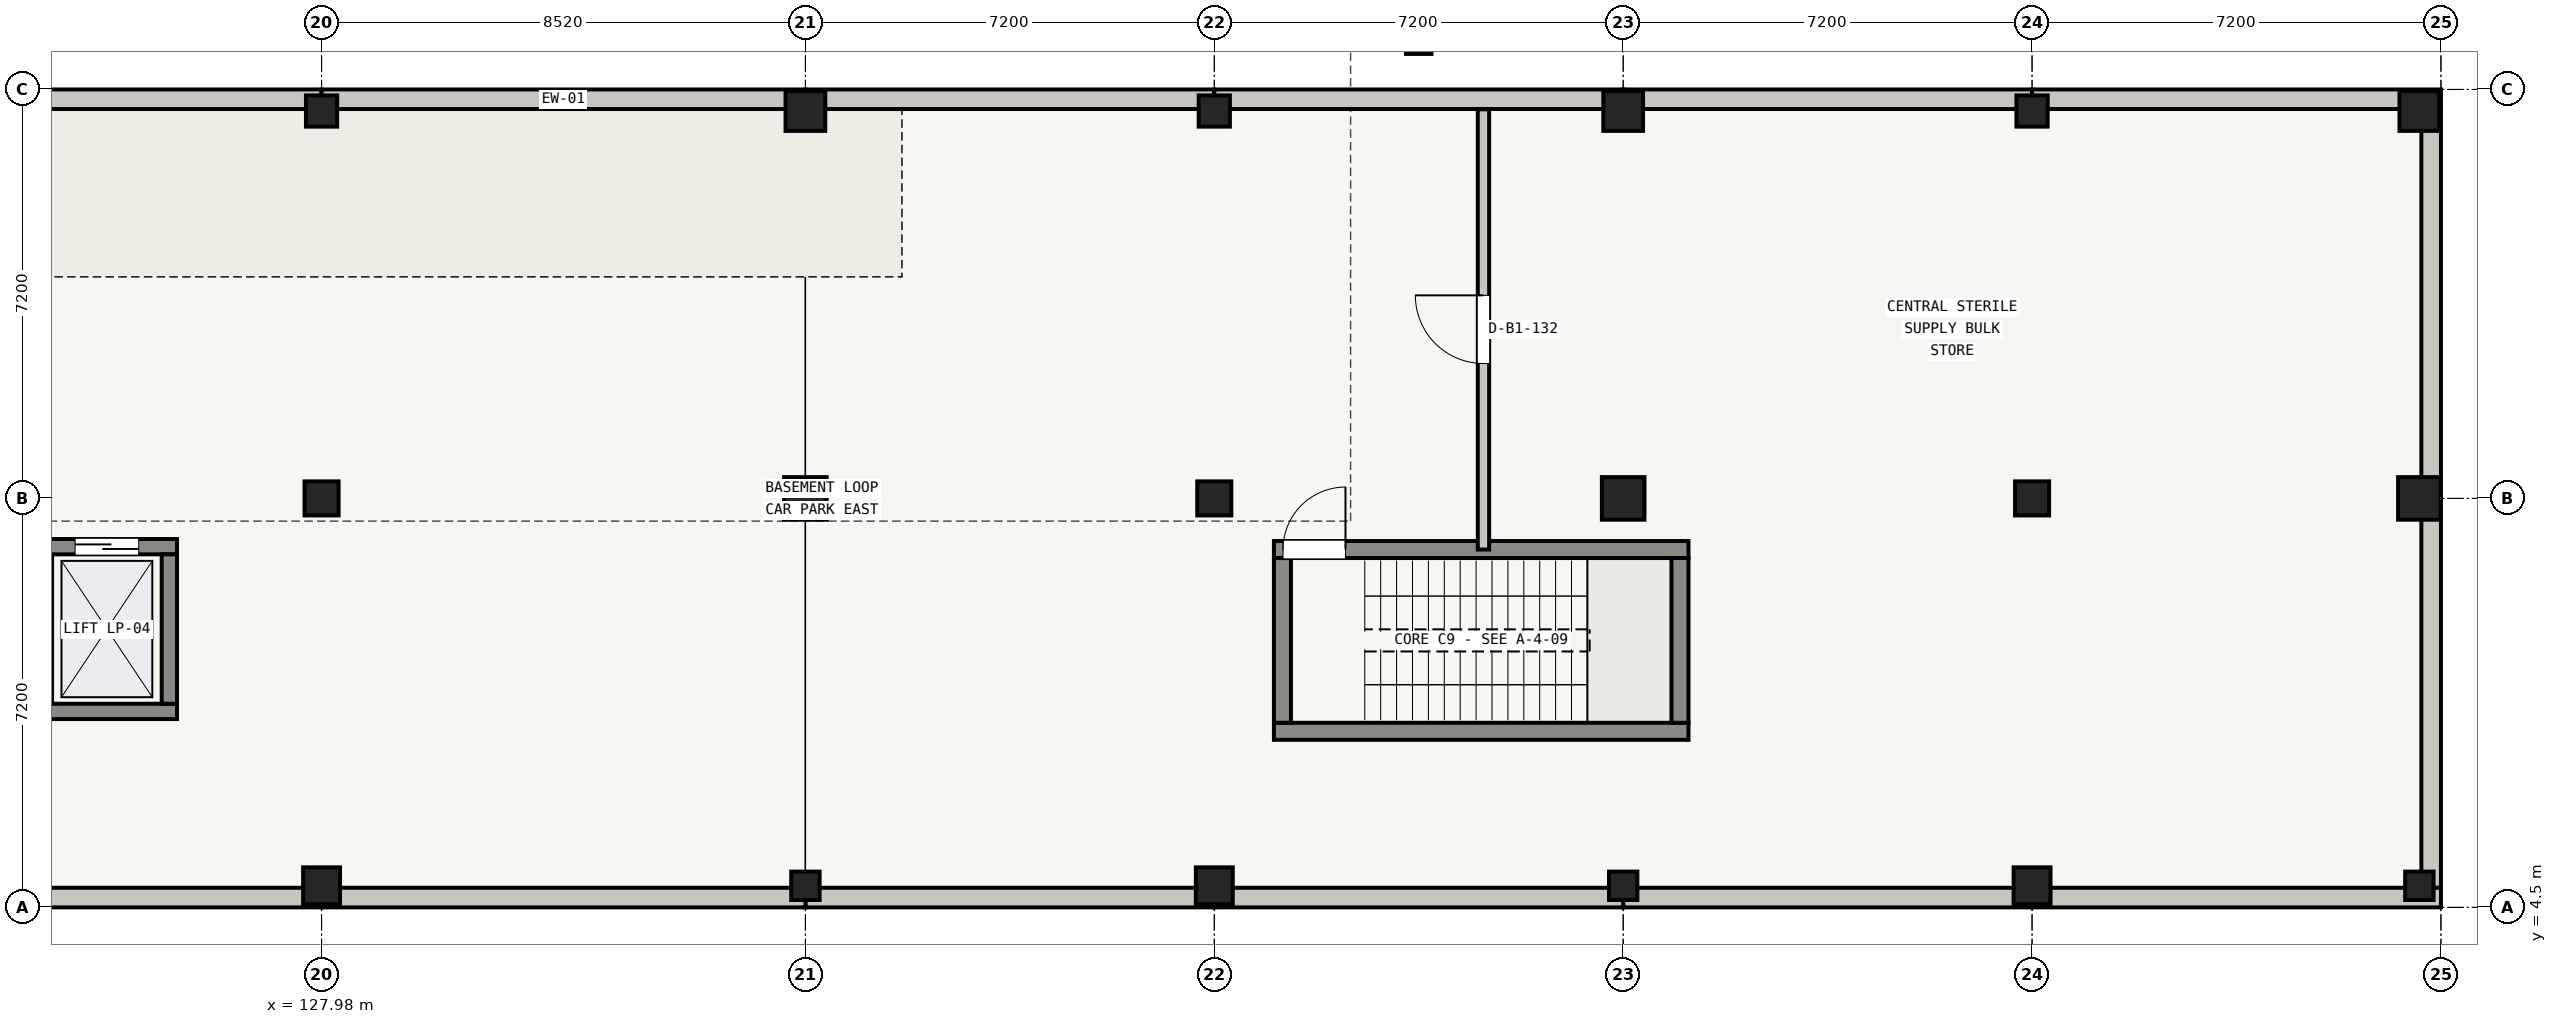
"""IFC4 building model, lengths in metres.
Left out: names, types, materials, properties, quantities, classifications, styles, units other than length and angle.
Written with IfcOpenShell. Run it as: python <this file> out.ifc"""

import sys

from ifc_helpers import new_model, si_unit, direction, frame, frame_2d, origin, origin_2d, place, context, subcontext, project, spatial, rectangle, extrude, element, fill, save


model = new_model("IFC4")
c1 = context("Model", 3, precision=1e-05, world=origin(), true_north=direction((0.0, 1.0)))
c2 = subcontext(c1, "Body", "Model", "MODEL_VIEW")
j1 = project(units=[si_unit("LENGTHUNIT", "METRE"), si_unit("PLANEANGLEUNIT", "RADIAN")], contexts=[c1])
p1 = place(None, origin())
s1 = spatial("IfcSite", under=j1, at=p1, CompositionType="ELEMENT")
p2 = place(p1, origin())
s2 = spatial("IfcBuilding", under=s1, at=p2, CompositionType="ELEMENT")
p3 = place(p2, frame((0.0, 0.0, -4.5)))
s3 = spatial("IfcBuildingStorey", under=s2, at=p3, CompositionType="ELEMENT", Elevation=-4.5)
p4 = place(p3, frame((147.3, 19.75, -0.42), z_axis=(0.0, 0.0, 1.0), x_axis=(1.0, 0.0, 0.0)))
e1 = element("IfcColumn", 1, at=p4, inside=s3, PredefinedType="COLUMN", context=c2, shape_type="SweptSolid", body=[
    extrude(rectangle(XDim=0.45, YDim=0.45, at=origin_2d()), origin(), (0.0, 0.0, 1.0), 1.83),
])
p5 = place(p3, frame((127.98, 4.88, -0.42), z_axis=(0.0, 0.0, 1.0), x_axis=(1.0, 0.0, 0.0)))
e2 = element("IfcColumn", 2, at=p5, inside=s3, PredefinedType="COLUMN", context=c2, shape_type="SweptSolid", body=[
    extrude(rectangle(XDim=0.65, YDim=0.65, at=origin_2d()), origin(), (0.0, 0.0, 1.0), 4.625),
])
p6 = place(p3, frame((127.98, 11.7, -0.42), z_axis=(0.0, 0.0, 1.0), x_axis=(1.0, 0.0, 0.0)))
e3 = element("IfcColumn", 3, at=p6, inside=s3, PredefinedType="COLUMN", context=c2, shape_type="SweptSolid", body=[
    extrude(rectangle(XDim=0.6, YDim=0.6, at=origin_2d()), origin(), (0.0, 0.0, 1.0), 4.625),
])
p7 = place(p3, frame((127.98, 18.52, -0.42), z_axis=(0.0, 0.0, 1.0), x_axis=(1.0, 0.0, 0.0)))
e4 = element("IfcColumn", 4, at=p7, inside=s3, PredefinedType="COLUMN", context=c2, shape_type="SweptSolid", body=[
    extrude(rectangle(XDim=0.55, YDim=0.55, at=origin_2d()), origin(), (0.0, 0.0, 1.0), 4.625),
])
p8 = place(p3, frame((136.5, 4.88, -0.42), z_axis=(0.0, 0.0, 1.0), x_axis=(1.0, 0.0, 0.0)))
e5 = element("IfcColumn", 5, at=p8, inside=s3, PredefinedType="COLUMN", context=c2, shape_type="SweptSolid", body=[
    extrude(rectangle(XDim=0.5, YDim=0.5, at=origin_2d()), origin(), (0.0, 0.0, 1.0), 4.625),
])
p9 = place(p3, frame((136.5, 11.7, -0.42), z_axis=(0.0, 0.0, 1.0), x_axis=(1.0, 0.0, 0.0)))
e6 = element("IfcColumn", 6, at=p9, inside=s3, PredefinedType="COLUMN", context=c2, shape_type="SweptSolid", body=[
    extrude(rectangle(XDim=0.75, YDim=0.75, at=origin_2d()), origin(), (0.0, 0.0, 1.0), 4.625),
])
p10 = place(p3, frame((136.5, 18.52, -0.42), z_axis=(0.0, 0.0, 1.0), x_axis=(1.0, 0.0, 0.0)))
e7 = element("IfcColumn", 7, at=p10, inside=s3, PredefinedType="COLUMN", context=c2, shape_type="SweptSolid", body=[
    extrude(rectangle(XDim=0.7, YDim=0.7, at=origin_2d()), origin(), (0.0, 0.0, 1.0), 4.625),
])
p11 = place(p3, frame((143.7, 4.88, -0.42), z_axis=(0.0, 0.0, 1.0), x_axis=(1.0, 0.0, 0.0)))
e8 = element("IfcColumn", 8, at=p11, inside=s3, PredefinedType="COLUMN", context=c2, shape_type="SweptSolid", body=[
    extrude(rectangle(XDim=0.65, YDim=0.65, at=origin_2d()), origin(), (0.0, 0.0, 1.0), 4.625),
])
p12 = place(p3, frame((143.7, 11.7, -0.42), z_axis=(0.0, 0.0, 1.0), x_axis=(1.0, 0.0, 0.0)))
e9 = element("IfcColumn", 9, at=p12, inside=s3, PredefinedType="COLUMN", context=c2, shape_type="SweptSolid", body=[
    extrude(rectangle(XDim=0.6, YDim=0.6, at=origin_2d()), origin(), (0.0, 0.0, 1.0), 4.625),
])
p13 = place(p3, frame((143.7, 18.52, -0.42), z_axis=(0.0, 0.0, 1.0), x_axis=(1.0, 0.0, 0.0)))
e10 = element("IfcColumn", 10, at=p13, inside=s3, PredefinedType="COLUMN", context=c2, shape_type="SweptSolid", body=[
    extrude(rectangle(XDim=0.55, YDim=0.55, at=origin_2d()), origin(), (0.0, 0.0, 1.0), 4.625),
])
p14 = place(p3, frame((150.9, 4.88, -0.42), z_axis=(0.0, 0.0, 1.0), x_axis=(1.0, 0.0, 0.0)))
e11 = element("IfcColumn", 11, at=p14, inside=s3, PredefinedType="COLUMN", context=c2, shape_type="SweptSolid", body=[
    extrude(rectangle(XDim=0.5, YDim=0.5, at=origin_2d()), origin(), (0.0, 0.0, 1.0), 4.625),
])
p15 = place(p3, frame((150.9, 11.7, -0.42), z_axis=(0.0, 0.0, 1.0), x_axis=(1.0, 0.0, 0.0)))
e12 = element("IfcColumn", 12, at=p15, inside=s3, PredefinedType="COLUMN", context=c2, shape_type="SweptSolid", body=[
    extrude(rectangle(XDim=0.75, YDim=0.75, at=origin_2d()), origin(), (0.0, 0.0, 1.0), 4.625),
])
p16 = place(p3, frame((150.9, 18.52, -0.42), z_axis=(0.0, 0.0, 1.0), x_axis=(1.0, 0.0, 0.0)))
e13 = element("IfcColumn", 13, at=p16, inside=s3, PredefinedType="COLUMN", context=c2, shape_type="SweptSolid", body=[
    extrude(rectangle(XDim=0.7, YDim=0.7, at=origin_2d()), origin(), (0.0, 0.0, 1.0), 4.625),
])
p17 = place(p3, frame((158.1, 4.88, -0.42), z_axis=(0.0, 0.0, 1.0), x_axis=(1.0, 0.0, 0.0)))
e14 = element("IfcColumn", 14, at=p17, inside=s3, PredefinedType="COLUMN", context=c2, shape_type="SweptSolid", body=[
    extrude(rectangle(XDim=0.65, YDim=0.65, at=origin_2d()), origin(), (0.0, 0.0, 1.0), 4.625),
])
p18 = place(p3, frame((158.1, 11.7, -0.42), z_axis=(0.0, 0.0, 1.0), x_axis=(1.0, 0.0, 0.0)))
e15 = element("IfcColumn", 15, at=p18, inside=s3, PredefinedType="COLUMN", context=c2, shape_type="SweptSolid", body=[
    extrude(rectangle(XDim=0.6, YDim=0.6, at=origin_2d()), origin(), (0.0, 0.0, 1.0), 4.625),
])
p19 = place(p3, frame((158.1, 18.52, -0.42), z_axis=(0.0, 0.0, 1.0), x_axis=(1.0, 0.0, 0.0)))
e16 = element("IfcColumn", 16, at=p19, inside=s3, PredefinedType="COLUMN", context=c2, shape_type="SweptSolid", body=[
    extrude(rectangle(XDim=0.55, YDim=0.55, at=origin_2d()), origin(), (0.0, 0.0, 1.0), 4.625),
])
p20 = place(p3, frame((164.92, 4.88, -0.42), z_axis=(0.0, 0.0, 1.0), x_axis=(1.0, 0.0, 0.0)))
e17 = element("IfcColumn", 17, at=p20, inside=s3, PredefinedType="COLUMN", context=c2, shape_type="SweptSolid", body=[
    extrude(rectangle(XDim=0.5, YDim=0.5, at=origin_2d()), origin(), (0.0, 0.0, 1.0), 4.625),
])
p21 = place(p3, frame((164.92, 11.7, -0.42), z_axis=(0.0, 0.0, 1.0), x_axis=(1.0, 0.0, 0.0)))
e18 = element("IfcColumn", 18, at=p21, inside=s3, PredefinedType="COLUMN", context=c2, shape_type="SweptSolid", body=[
    extrude(rectangle(XDim=0.75, YDim=0.75, at=origin_2d()), origin(), (0.0, 0.0, 1.0), 4.625),
])
p22 = place(p3, frame((164.92, 18.52, -0.42), z_axis=(0.0, 0.0, 1.0), x_axis=(1.0, 0.0, 0.0)))
e19 = element("IfcColumn", 19, at=p22, inside=s3, PredefinedType="COLUMN", context=c2, shape_type="SweptSolid", body=[
    extrude(rectangle(XDim=0.7, YDim=0.7, at=origin_2d()), origin(), (0.0, 0.0, 1.0), 4.625),
])
p23 = place(p3, frame((120.54, 18.728, -0.42), z_axis=(0.0, 0.0, 1.0), x_axis=(1.0, 0.0, 0.0)))
e20 = element("IfcWall", 20, at=p23, inside=s3, PredefinedType="SOLIDWALL", context=c2, shape_type="SweptSolid", body=[
    extrude(rectangle(XDim=7.44, YDim=0.345, at=frame_2d((3.72, 0.0))), origin(), (0.0, 0.0, 1.0), 3.99),
])
p24 = place(p3, frame((127.98, 18.728, -0.42), z_axis=(0.0, 0.0, 1.0), x_axis=(1.0, 0.0, 0.0)))
e21 = element("IfcWall", 21, at=p24, inside=s3, PredefinedType="SOLIDWALL", context=c2, shape_type="SweptSolid", body=[
    extrude(rectangle(XDim=8.52, YDim=0.345, at=frame_2d((4.26, 0.0))), origin(), (0.0, 0.0, 1.0), 4.01),
])
p25 = place(p3, frame((136.5, 18.728, -0.42), z_axis=(0.0, 0.0, 1.0), x_axis=(1.0, 0.0, 0.0)))
e22 = element("IfcWall", 22, at=p25, inside=s3, PredefinedType="SOLIDWALL", context=c2, shape_type="SweptSolid", body=[
    extrude(rectangle(XDim=7.2, YDim=0.345, at=frame_2d((3.6, 0.0))), origin(), (0.0, 0.0, 1.0), 4.01),
])
p26 = place(p3, frame((143.7, 18.728, -0.42), z_axis=(0.0, 0.0, 1.0), x_axis=(1.0, 0.0, 0.0)))
e23 = element("IfcWall", 23, at=p26, inside=s3, PredefinedType="SOLIDWALL", context=c2, shape_type="SweptSolid", body=[
    extrude(rectangle(XDim=7.2, YDim=0.345, at=frame_2d((3.6, 0.0))), origin(), (0.0, 0.0, 1.0), 3.99),
])
p27 = place(p3, frame((150.9, 18.728, -0.42), z_axis=(0.0, 0.0, 1.0), x_axis=(1.0, 0.0, 0.0)))
e24 = element("IfcWall", 24, at=p27, inside=s3, PredefinedType="SOLIDWALL", context=c2, shape_type="SweptSolid", body=[
    extrude(rectangle(XDim=7.2, YDim=0.345, at=frame_2d((3.6, 0.0))), origin(), (0.0, 0.0, 1.0), 3.81),
])
p28 = place(p3, frame((158.1, 18.728, -0.42), z_axis=(0.0, 0.0, 1.0), x_axis=(1.0, 0.0, 0.0)))
e25 = element("IfcWall", 25, at=p28, inside=s3, PredefinedType="SOLIDWALL", context=c2, shape_type="SweptSolid", body=[
    extrude(rectangle(XDim=7.2, YDim=0.345, at=frame_2d((3.6, 0.0))), origin(), (0.0, 0.0, 1.0), 3.81),
])
for number, where, z_axis, x_axis in (
    (26, (165.127, 18.555, -0.42), (0.0, 0.0, 1.0), (0.0, -1.0, 0.0)),
    (27, (165.127, 11.7, -0.42), (0.0, 0.0, 1.0), (0.0, -1.0, 0.0)),
):
    element("IfcWall", number, at=place(p3, frame(where, z_axis=z_axis, x_axis=x_axis)), inside=s3, PredefinedType="SOLIDWALL", context=c2, shape_type="SweptSolid", body=[
        extrude(rectangle(XDim=6.855, YDim=0.345, at=frame_2d((3.427, 0.0))), origin(), (0.0, 0.0, 1.0), 4.06),
    ])
p29 = place(p3, frame((165.3, 4.673, -0.42), z_axis=(0.0, 0.0, 1.0), x_axis=(-1.0, 0.0, 0.0)))
e28 = element("IfcWall", 28, at=p29, inside=s3, PredefinedType="SOLIDWALL", context=c2, shape_type="SweptSolid", body=[
    extrude(rectangle(XDim=7.2, YDim=0.345, at=frame_2d((3.6, 0.0))), origin(), (0.0, 0.0, 1.0), 4.01),
])
p30 = place(p3, frame((158.1, 4.673, -0.42), z_axis=(0.0, 0.0, 1.0), x_axis=(-1.0, 0.0, 0.0)))
e29 = element("IfcWall", 29, at=p30, inside=s3, PredefinedType="SOLIDWALL", context=c2, shape_type="SweptSolid", body=[
    extrude(rectangle(XDim=7.2, YDim=0.345, at=frame_2d((3.6, 0.0))), origin(), (0.0, 0.0, 1.0), 3.99),
])
for number, where, z_axis, x_axis in (
    (30, (150.9, 4.673, -0.42), (0.0, 0.0, 1.0), (-1.0, 0.0, 0.0)),
    (31, (143.7, 4.673, -0.42), (0.0, 0.0, 1.0), (-1.0, 0.0, 0.0)),
):
    element("IfcWall", number, at=place(p3, frame(where, z_axis=z_axis, x_axis=x_axis)), inside=s3, PredefinedType="SOLIDWALL", context=c2, shape_type="SweptSolid", body=[
        extrude(rectangle(XDim=7.2, YDim=0.345, at=frame_2d((3.6, 0.0))), origin(), (0.0, 0.0, 1.0), 3.99),
    ])
p31 = place(p3, frame((136.5, 4.673, -0.42), z_axis=(0.0, 0.0, 1.0), x_axis=(-1.0, 0.0, 0.0)))
e32 = element("IfcWall", 32, at=p31, inside=s3, PredefinedType="SOLIDWALL", context=c2, shape_type="SweptSolid", body=[
    extrude(rectangle(XDim=8.52, YDim=0.345, at=frame_2d((4.26, 0.0))), origin(), (0.0, 0.0, 1.0), 4.01),
])
p32 = place(p3, frame((127.98, 4.673, -0.42), z_axis=(0.0, 0.0, 1.0), x_axis=(-1.0, 0.0, 0.0)))
e33 = element("IfcWall", 33, at=p32, inside=s3, PredefinedType="SOLIDWALL", context=c2, shape_type="SweptSolid", body=[
    extrude(rectangle(XDim=7.44, YDim=0.345, at=frame_2d((3.72, 0.0))), origin(), (0.0, 0.0, 1.0), 4.01),
])
p33 = place(p3, frame((125.435, 7.95, 0.0), z_axis=(0.0, 0.0, 1.0), x_axis=(-1.0, 0.0, 0.0)))
e34 = element("IfcWall", 34, at=p33, inside=s3, PredefinedType="SHEAR", context=c2, shape_type="SweptSolid", body=[
    extrude(rectangle(XDim=2.47, YDim=0.27, at=frame_2d((1.235, 0.0))), origin(), (0.0, 0.0, 1.0), 4.205),
])
p34 = place(p3, frame((122.965, 10.85, 0.0), z_axis=(0.0, 0.0, 1.0), x_axis=(1.0, 0.0, 0.0)))
e35 = element("IfcWall", 35, at=p34, inside=s3, PredefinedType="SHEAR", context=c2, shape_type="SweptSolid", body=[
    extrude(rectangle(XDim=2.47, YDim=0.27, at=frame_2d((1.235, 0.0))), origin(), (0.0, 0.0, 1.0), 4.205),
])
p35 = place(p34, frame((0.675, 0.0, 0.0)))
e36 = element("IfcOpeningElement", 36, at=p35, cuts=e35, PredefinedType="OPENING", context=c2, shape_type="SweptSolid", body=[
    extrude(rectangle(XDim=1.12, YDim=2.1, at=frame_2d((0.56, 1.05))), frame((0.0, 0.135, 0.0), z_axis=(0.0, -1.0, 0.0), x_axis=(1.0, 0.0, 0.0)), (0.0, 0.0, 1.0), 0.27),
])
p36 = place(p3, frame((125.3, 10.715, 0.0), z_axis=(0.0, 0.0, 1.0), x_axis=(0.0, -1.0, 0.0)))
e37 = element("IfcWall", 37, at=p36, inside=s3, PredefinedType="SHEAR", context=c2, shape_type="SweptSolid", body=[
    extrude(rectangle(XDim=2.63, YDim=0.27, at=frame_2d((1.315, 0.0))), origin(), (0.0, 0.0, 1.0), 4.205),
])
p37 = place(p3, frame((152.05, 7.6, 0.0), z_axis=(0.0, 0.0, 1.0), x_axis=(-1.0, 0.0, 0.0)))
e38 = element("IfcWall", 38, at=p37, inside=s3, PredefinedType="SHEAR", context=c2, shape_type="SweptSolid", body=[
    extrude(rectangle(XDim=7.3, YDim=0.3, at=frame_2d((3.65, 0.0))), origin(), (0.0, 0.0, 1.0), 4.205),
])
p38 = place(p3, frame((144.9, 7.75, 0.0), z_axis=(0.0, 0.0, 1.0), x_axis=(0.0, 1.0, 0.0)))
e39 = element("IfcWall", 39, at=p38, inside=s3, PredefinedType="SHEAR", context=c2, shape_type="SweptSolid", body=[
    extrude(rectangle(XDim=2.9, YDim=0.3, at=frame_2d((1.45, 0.0))), origin(), (0.0, 0.0, 1.0), 4.205),
])
p39 = place(p3, frame((144.75, 10.8, 0.0), z_axis=(0.0, 0.0, 1.0), x_axis=(1.0, 0.0, 0.0)))
e40 = element("IfcWall", 40, at=p39, inside=s3, PredefinedType="SHEAR", context=c2, shape_type="SweptSolid", body=[
    extrude(rectangle(XDim=7.3, YDim=0.3, at=frame_2d((3.65, 0.0))), origin(), (0.0, 0.0, 1.0), 4.205),
])
p40 = place(p39, frame((0.16, 0.0, 0.0)))
e41 = element("IfcOpeningElement", 41, at=p40, cuts=e40, PredefinedType="OPENING", context=c2, shape_type="SweptSolid", body=[
    extrude(rectangle(XDim=1.1, YDim=2.05, at=frame_2d((0.55, 1.025))), frame((0.0, 0.15, 0.0), z_axis=(0.0, -1.0, 0.0), x_axis=(1.0, 0.0, 0.0)), (0.0, 0.0, 1.0), 0.3),
])
p41 = place(p3, frame((151.9, 10.65, 0.0), z_axis=(0.0, 0.0, 1.0), x_axis=(0.0, -1.0, 0.0)))
e42 = element("IfcWall", 42, at=p41, inside=s3, PredefinedType="SHEAR", context=c2, shape_type="SweptSolid", body=[
    extrude(rectangle(XDim=2.9, YDim=0.3, at=frame_2d((1.45, 0.0))), origin(), (0.0, 0.0, 1.0), 4.205),
])
p42 = place(p3, frame((148.44, 10.8, 0.0), z_axis=(0.0, 0.0, 1.0), x_axis=(0.0, 1.0, 0.0)))
e43 = element("IfcWall", 43, at=p42, inside=s3, PredefinedType="SOLIDWALL", context=c2, shape_type="SweptSolid", body=[
    extrude(rectangle(XDim=7.75, YDim=0.2, at=frame_2d((3.875, 0.0))), origin(), (0.0, 0.0, 1.0), 3.225),
])
p43 = place(p42, frame((3.275, 0.0, 0.0)))
e44 = element("IfcOpeningElement", 44, at=p43, cuts=e43, PredefinedType="OPENING", context=c2, shape_type="SweptSolid", body=[
    extrude(rectangle(XDim=1.2, YDim=2.05, at=frame_2d((0.6, 1.025))), frame((0.0, 0.1, 0.0), z_axis=(0.0, -1.0, 0.0), x_axis=(1.0, 0.0, 0.0)), (0.0, 0.0, 1.0), 0.2),
])
p44 = place(p35, origin())
e45 = element("IfcDoor", 45, at=p44, inside=s3, OperationType="DOUBLE_DOOR_SLIDING", PredefinedType="DOOR", context=c2, shape_type="SweptSolid", body=[
    extrude(rectangle(XDim=1.12, YDim=2.1, at=frame_2d((0.56, 1.05))), frame((0.0, 0.025, 0.0), z_axis=(0.0, -1.0, 0.0), x_axis=(1.0, 0.0, 0.0)), (0.0, 0.0, 1.0), 0.05),
])
fill(e36, e45)
p45 = place(p40, origin())
e46 = element("IfcDoor", 46, at=p45, inside=s3, OperationType="SINGLE_SWING_RIGHT", PredefinedType="DOOR", context=c2, shape_type="SweptSolid", body=[
    extrude(rectangle(XDim=1.1, YDim=2.05, at=frame_2d((0.55, 1.025))), frame((0.0, 0.025, 0.0), z_axis=(0.0, -1.0, 0.0), x_axis=(1.0, 0.0, 0.0)), (0.0, 0.0, 1.0), 0.05),
])
fill(e41, e46)
p46 = place(p43, origin())
e47 = element("IfcDoor", 47, at=p46, inside=s3, OperationType="SINGLE_SWING_RIGHT", PredefinedType="DOOR", context=c2, shape_type="SweptSolid", body=[
    extrude(rectangle(XDim=1.2, YDim=2.05, at=frame_2d((0.6, 1.025))), frame((0.0, 0.025, 0.0), z_axis=(0.0, -1.0, 0.0), x_axis=(1.0, 0.0, 0.0)), (0.0, 0.0, 1.0), 0.05),
])
fill(e44, e47)
save(model, sys.argv[1])
